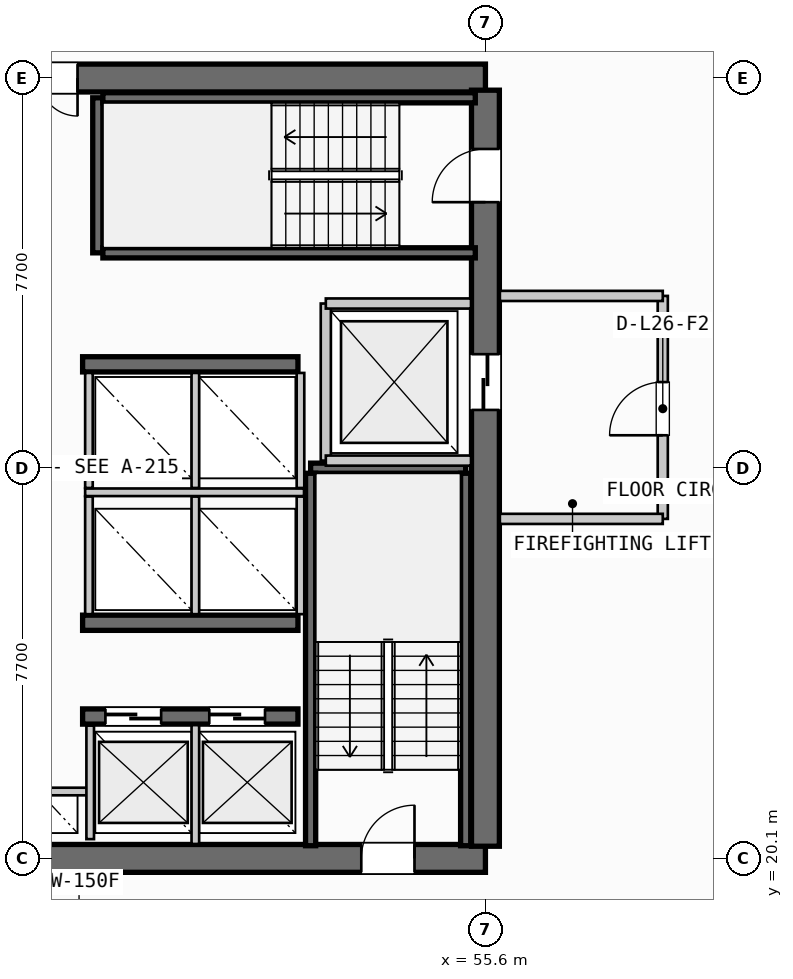
"""IFC4 building model, lengths in metres.
Left out: names, types, materials, properties, quantities, classifications, styles, units other than length and angle.
Written with IfcOpenShell. Run it as: python <this file> out.ifc"""

import sys

from ifc_helpers import new_model, si_unit, direction, frame, frame_2d, origin, place, context, subcontext, project, spatial, rectangle, extrude, source, transform, mapped, element, fill, save


model = new_model("IFC4")
c1 = context("Model", 3, precision=1e-05, world=origin(), true_north=direction((0.0, 1.0)))
c2 = subcontext(c1, "Body", "Model", "MODEL_VIEW")
j1 = project(units=[si_unit("LENGTHUNIT", "METRE"), si_unit("PLANEANGLEUNIT", "RADIAN")], contexts=[c1])
p1 = place(None, origin())
s1 = spatial("IfcSite", under=j1, at=p1, CompositionType="ELEMENT")
p2 = place(p1, origin())
s2 = spatial("IfcBuilding", under=s1, at=p2, CompositionType="ELEMENT")
p3 = place(p2, frame((0.0, 0.0, 107.2)))
s3 = spatial("IfcBuildingStorey", under=s2, at=p3, CompositionType="ELEMENT", Elevation=107.2)
p4 = place(p3, frame((38.0, 20.1, 0.0), z_axis=(0.0, 0.0, 1.0), x_axis=(1.0, 0.0, 0.0)))
e1 = element("IfcWall", 1, at=p4, inside=s3, PredefinedType="SHEAR", context=c2, shape_type="SweptSolid", body=[
    extrude(rectangle(XDim=17.6, YDim=0.55, at=frame_2d((8.8, 0.0))), origin(), (0.0, 0.0, 1.0), 3.35),
])
p5 = place(p4, frame((1.4, 0.0, 0.0)))
e2 = element("IfcOpeningElement", 2, at=p5, cuts=e1, PredefinedType="OPENING", context=c2, shape_type="SweptSolid", body=[
    extrude(rectangle(XDim=1.05, YDim=2.15, at=frame_2d((0.525, 1.075))), frame((0.0, 0.285, 0.0), z_axis=(0.0, -1.0, 0.0), x_axis=(1.0, 0.0, 0.0)), (0.0, 0.0, 1.0), 0.57),
])
p6 = place(p4, frame((15.15, 0.0, 0.0)))
e3 = element("IfcOpeningElement", 3, at=p6, cuts=e1, PredefinedType="OPENING", context=c2, shape_type="SweptSolid", body=[
    extrude(rectangle(XDim=1.05, YDim=2.15, at=frame_2d((0.525, 1.075))), frame((0.0, 0.285, 0.0), z_axis=(0.0, -1.0, 0.0), x_axis=(1.0, 0.0, 0.0)), (0.0, 0.0, 1.0), 0.57),
])
p7 = place(p3, frame((55.6, 35.5, 0.0), z_axis=(0.0, 0.0, 1.0), x_axis=(-1.0, 0.0, 0.0)))
e4 = element("IfcWall", 4, at=p7, inside=s3, PredefinedType="SHEAR", context=c2, shape_type="SweptSolid", body=[
    extrude(rectangle(XDim=17.6, YDim=0.55, at=frame_2d((8.8, 0.0))), origin(), (0.0, 0.0, 1.0), 3.35),
])
p8 = place(p7, frame((8.05, 0.0, 0.0)))
e5 = element("IfcOpeningElement", 5, at=p8, cuts=e4, PredefinedType="OPENING", context=c2, shape_type="SweptSolid", body=[
    extrude(rectangle(XDim=1.5, YDim=2.2, at=frame_2d((0.75, 1.1))), frame((0.0, 0.285, 0.0), z_axis=(0.0, -1.0, 0.0), x_axis=(1.0, 0.0, 0.0)), (0.0, 0.0, 1.0), 0.57),
])
p9 = place(p7, frame((14.95, 0.0, 0.0)))
e6 = element("IfcOpeningElement", 6, at=p9, cuts=e4, PredefinedType="OPENING", context=c2, shape_type="SweptSolid", body=[
    extrude(rectangle(XDim=1.4, YDim=2.3, at=frame_2d((0.7, 1.15))), frame((0.0, 0.285, 0.0), z_axis=(0.0, -1.0, 0.0), x_axis=(1.0, 0.0, 0.0)), (0.0, 0.0, 1.0), 0.57),
])
p10 = place(p7, frame((12.9, 0.0, 0.0)))
e7 = element("IfcOpeningElement", 7, at=p10, cuts=e4, PredefinedType="OPENING", context=c2, shape_type="SweptSolid", body=[
    extrude(rectangle(XDim=0.9, YDim=2.15, at=frame_2d((0.45, 1.075))), frame((0.0, 0.285, 0.0), z_axis=(0.0, -1.0, 0.0), x_axis=(1.0, 0.0, 0.0)), (0.0, 0.0, 1.0), 0.57),
])
p11 = place(p7, frame((10.6, 0.0, 0.0)))
e8 = element("IfcOpeningElement", 8, at=p11, cuts=e4, PredefinedType="OPENING", context=c2, shape_type="SweptSolid", body=[
    extrude(rectangle(XDim=0.95, YDim=2.15, at=frame_2d((0.475, 1.075))), frame((0.0, 0.285, 0.0), z_axis=(0.0, -1.0, 0.0), x_axis=(1.0, 0.0, 0.0)), (0.0, 0.0, 1.0), 0.57),
])
p12 = place(p3, frame((55.6, 20.34, 0.0), z_axis=(0.0, 0.0, 1.0), x_axis=(0.0, 1.0, 0.0)))
e9 = element("IfcWall", 9, at=p12, inside=s3, PredefinedType="SHEAR", context=c2, shape_type="SweptSolid", body=[
    extrude(rectangle(XDim=14.92, YDim=0.55, at=frame_2d((7.46, 0.0))), origin(), (0.0, 0.0, 1.0), 3.35),
])
p13 = place(p12, frame((12.71, 0.0, 0.0)))
e10 = element("IfcOpeningElement", 10, at=p13, cuts=e9, PredefinedType="OPENING", context=c2, shape_type="SweptSolid", body=[
    extrude(rectangle(XDim=1.05, YDim=2.15, at=frame_2d((0.525, 1.075))), frame((0.0, 0.285, 0.0), z_axis=(0.0, -1.0, 0.0), x_axis=(1.0, 0.0, 0.0)), (0.0, 0.0, 1.0), 0.57),
])
p14 = place(p12, frame((8.61, 0.0, 0.0)))
e11 = element("IfcOpeningElement", 11, at=p14, cuts=e9, PredefinedType="OPENING", context=c2, shape_type="SweptSolid", body=[
    extrude(rectangle(XDim=1.1, YDim=2.2, at=frame_2d((0.55, 1.1))), frame((0.0, 0.285, 0.0), z_axis=(0.0, -1.0, 0.0), x_axis=(1.0, 0.0, 0.0)), (0.0, 0.0, 1.0), 0.57),
])
p15 = place(p3, frame((47.65, 22.9, 0.0), z_axis=(0.0, 0.0, 1.0), x_axis=(1.0, 0.0, 0.0)))
e12 = element("IfcWall", 12, at=p15, inside=s3, PredefinedType="SHEAR", context=c2, shape_type="SweptSolid", body=[
    extrude(rectangle(XDim=4.25, YDim=0.3, at=frame_2d((2.125, 0.0))), origin(), (0.0, 0.0, 1.0), 3.35),
])
p16 = place(p15, frame((0.45, 0.0, 0.0)))
e13 = element("IfcOpeningElement", 13, at=p16, cuts=e12, PredefinedType="OPENING", context=c2, shape_type="SweptSolid", body=[
    extrude(rectangle(XDim=1.1, YDim=2.2, at=frame_2d((0.55, 1.1))), frame((0.0, 0.16, 0.0), z_axis=(0.0, -1.0, 0.0), x_axis=(1.0, 0.0, 0.0)), (0.0, 0.0, 1.0), 0.32),
])
p17 = place(p15, frame((2.5, 0.0, 0.0)))
e14 = element("IfcOpeningElement", 14, at=p17, cuts=e12, PredefinedType="OPENING", context=c2, shape_type="SweptSolid", body=[
    extrude(rectangle(XDim=1.1, YDim=2.2, at=frame_2d((0.55, 1.1))), frame((0.0, 0.16, 0.0), z_axis=(0.0, -1.0, 0.0), x_axis=(1.0, 0.0, 0.0)), (0.0, 0.0, 1.0), 0.32),
])
for number, where, z_axis, x_axis in (
    (15, (47.65, 24.75, 0.0), (0.0, 0.0, 1.0), (1.0, 0.0, 0.0)),
    (16, (47.65, 29.85, 0.0), (0.0, 0.0, 1.0), (1.0, 0.0, 0.0)),
):
    element("IfcWall", number, at=place(p3, frame(where, z_axis=z_axis, x_axis=x_axis)), inside=s3, PredefinedType="SHEAR", context=c2, shape_type="SweptSolid", body=[
        extrude(rectangle(XDim=4.25, YDim=0.3, at=frame_2d((2.125, 0.0))), origin(), (0.0, 0.0, 1.0), 3.35),
    ])
p18 = place(p3, frame((52.15, 27.8, 0.0), z_axis=(0.0, 0.0, 1.0), x_axis=(1.0, 0.0, 0.0)))
e17 = element("IfcWall", 17, at=p18, inside=s3, PredefinedType="SHEAR", context=c2, shape_type="SweptSolid", body=[
    extrude(rectangle(XDim=3.06, YDim=0.2, at=frame_2d((1.53, 0.0))), origin(), (0.0, 0.0, 1.0), 3.35),
])
for number, where, z_axis, x_axis in (
    (18, (55.21, 27.7, 0.0), (0.0, 0.0, 1.0), (0.0, -1.0, 0.0)),
    (19, (52.15, 20.35, 0.0), (0.0, 0.0, 1.0), (0.0, 1.0, 0.0)),
):
    element("IfcWall", number, at=place(p3, frame(where, z_axis=z_axis, x_axis=x_axis)), inside=s3, PredefinedType="SHEAR", context=c2, shape_type="SweptSolid", body=[
        extrude(rectangle(XDim=7.35, YDim=0.2, at=frame_2d((3.675, 0.0))), origin(), (0.0, 0.0, 1.0), 3.35),
    ])
p19 = place(p3, frame((47.95, 32.05, 0.0), z_axis=(0.0, 0.0, 1.0), x_axis=(0.0, 1.0, 0.0)))
e20 = element("IfcWall", 20, at=p19, inside=s3, PredefinedType="SHEAR", context=c2, shape_type="SweptSolid", body=[
    extrude(rectangle(XDim=3.06, YDim=0.2, at=frame_2d((1.53, 0.0))), origin(), (0.0, 0.0, 1.0), 3.35),
])
for number, where, z_axis, x_axis in (
    (21, (48.05, 35.11, 0.0), (0.0, 0.0, 1.0), (1.0, 0.0, 0.0)),
    (22, (55.4, 32.05, 0.0), (0.0, 0.0, 1.0), (-1.0, 0.0, 0.0)),
):
    element("IfcWall", number, at=place(p3, frame(where, z_axis=z_axis, x_axis=x_axis)), inside=s3, PredefinedType="SHEAR", context=c2, shape_type="SweptSolid", body=[
        extrude(rectangle(XDim=7.35, YDim=0.2, at=frame_2d((3.675, 0.0))), origin(), (0.0, 0.0, 1.0), 3.35),
    ])
p20 = place(p3, frame((45.8, 21.42, 0.0), z_axis=(0.0, 0.0, 1.0), x_axis=(1.0, 0.0, 0.0)))
e23 = element("IfcWall", 23, at=p20, inside=s3, PredefinedType="PARTITIONING", context=c2, shape_type="SweptSolid", body=[
    extrude(rectangle(XDim=2.0, YDim=0.15, at=frame_2d((1.0, 0.0))), origin(), (0.0, 0.0, 1.0), 2.28),
])
p21 = place(p3, frame((47.8, 20.48, 0.0), z_axis=(0.0, 0.0, 1.0), x_axis=(0.0, 1.0, 0.0)))
e24 = element("IfcWall", 24, at=p21, inside=s3, PredefinedType="PARTITIONING", context=c2, shape_type="SweptSolid", body=[
    extrude(rectangle(XDim=2.24, YDim=0.15, at=frame_2d((1.12, 0.0))), origin(), (0.0, 0.0, 1.0), 2.28),
])
p22 = place(p3, frame((52.45, 27.95, 0.0), z_axis=(0.0, 0.0, 1.0), x_axis=(0.0, 1.0, 0.0)))
e25 = element("IfcWall", 25, at=p22, inside=s3, PredefinedType="PARTITIONING", context=c2, shape_type="SweptSolid", body=[
    extrude(rectangle(XDim=3.1, YDim=0.2, at=frame_2d((1.55, 0.0))), origin(), (0.0, 0.0, 1.0), 2.28),
])
for number, where, z_axis, x_axis in (
    (26, (52.45, 27.95, 0.0), (0.0, 0.0, 1.0), (1.0, 0.0, 0.0)),
    (27, (52.45, 31.05, 0.0), (0.0, 0.0, 1.0), (1.0, 0.0, 0.0)),
):
    element("IfcWall", number, at=place(p3, frame(where, z_axis=z_axis, x_axis=x_axis)), inside=s3, PredefinedType="PARTITIONING", context=c2, shape_type="SweptSolid", body=[
        extrude(rectangle(XDim=2.865, YDim=0.2, at=frame_2d((1.433, 0.0))), origin(), (0.0, 0.0, 1.0), 2.28),
    ])
p23 = place(p3, frame((59.1, 26.8, 0.0), z_axis=(0.0, 0.0, 1.0), x_axis=(0.0, 1.0, 0.0)))
e28 = element("IfcWall", 28, at=p23, inside=s3, PredefinedType="PARTITIONING", context=c2, shape_type="SweptSolid", body=[
    extrude(rectangle(XDim=4.4, YDim=0.2, at=frame_2d((2.2, 0.0))), origin(), (0.0, 0.0, 1.0), 2.28),
])
p24 = place(p23, frame((1.65, 0.0, 0.0)))
e29 = element("IfcOpeningElement", 29, at=p24, cuts=e28, PredefinedType="OPENING", context=c2, shape_type="SweptSolid", body=[
    extrude(rectangle(XDim=1.05, YDim=2.15, at=frame_2d((0.525, 1.075))), frame((0.0, 0.11, 0.0), z_axis=(0.0, -1.0, 0.0), x_axis=(1.0, 0.0, 0.0)), (0.0, 0.0, 1.0), 0.22),
])
for number, where, z_axis, x_axis in (
    (30, (55.885, 26.8, 0.0), (0.0, 0.0, 1.0), (1.0, 0.0, 0.0)),
    (31, (55.885, 31.2, 0.0), (0.0, 0.0, 1.0), (1.0, 0.0, 0.0)),
):
    element("IfcWall", number, at=place(p3, frame(where, z_axis=z_axis, x_axis=x_axis)), inside=s3, PredefinedType="PARTITIONING", context=c2, shape_type="SweptSolid", body=[
        extrude(rectangle(XDim=3.215, YDim=0.2, at=frame_2d((1.607, 0.0))), origin(), (0.0, 0.0, 1.0), 2.28),
    ])
p25 = place(p3, frame((49.875, 20.385, 0.0), z_axis=(0.0, 0.0, 1.0), x_axis=(0.0, 1.0, 0.0)))
e32 = element("IfcWall", 32, at=p25, inside=s3, PredefinedType="PARTITIONING", context=c2, shape_type="SweptSolid", body=[
    extrude(rectangle(XDim=2.345, YDim=0.15, at=frame_2d((1.172, 0.0))), origin(), (0.0, 0.0, 1.0), 2.28),
])
p26 = place(p3, frame((47.7, 27.325, 0.0), z_axis=(0.0, 0.0, 1.0), x_axis=(1.0, 0.0, 0.0)))
e33 = element("IfcWall", 33, at=p26, inside=s3, PredefinedType="PARTITIONING", context=c2, shape_type="SweptSolid", body=[
    extrude(rectangle(XDim=4.32, YDim=0.15, at=frame_2d((2.16, 0.0))), origin(), (0.0, 0.0, 1.0), 2.28),
])
for number, where, z_axis, x_axis in (
    (34, (47.775, 24.92, 0.0), (0.0, 0.0, 1.0), (0.0, 1.0, 0.0)),
    (35, (49.875, 24.92, 0.0), (0.0, 0.0, 1.0), (0.0, 1.0, 0.0)),
    (36, (51.95, 24.92, 0.0), (0.0, 0.0, 1.0), (0.0, 1.0, 0.0)),
):
    element("IfcWall", number, at=place(p3, frame(where, z_axis=z_axis, x_axis=x_axis)), inside=s3, PredefinedType="PARTITIONING", context=c2, shape_type="SweptSolid", body=[
        extrude(rectangle(XDim=2.32, YDim=0.15, at=frame_2d((1.16, 0.0))), origin(), (0.0, 0.0, 1.0), 2.28),
    ])
for number, where, z_axis, x_axis in (
    (37, (47.775, 27.41, 0.0), (0.0, 0.0, 1.0), (0.0, 1.0, 0.0)),
    (38, (49.875, 27.41, 0.0), (0.0, 0.0, 1.0), (0.0, 1.0, 0.0)),
    (39, (51.95, 27.41, 0.0), (0.0, 0.0, 1.0), (0.0, 1.0, 0.0)),
):
    element("IfcWall", number, at=place(p3, frame(where, z_axis=z_axis, x_axis=x_axis)), inside=s3, PredefinedType="PARTITIONING", context=c2, shape_type="SweptSolid", body=[
        extrude(rectangle(XDim=2.27, YDim=0.15, at=frame_2d((1.135, 0.0))), origin(), (0.0, 0.0, 1.0), 2.28),
    ])
m1 = source(origin(), c2, "Body", "SweptSolid", [
    extrude(rectangle(XDim=1.05, YDim=2.15, at=frame_2d((0.525, 1.075))), frame((0.0, 0.025, 0.0), z_axis=(0.0, -1.0, 0.0), x_axis=(1.0, 0.0, 0.0)), (0.0, 0.0, 1.0), 0.05),
])
p27 = place(p6, origin())
e40 = element("IfcDoor", 40, at=p27, inside=s3, OperationType="SINGLE_SWING_RIGHT", PredefinedType="DOOR", context=c2, shape_type="MappedRepresentation", body=[
    mapped(m1, transform((0.0, 0.0, 0.0), scale=1.0)),
])
fill(e3, e40)
p28 = place(p13, origin())
e41 = element("IfcDoor", 41, at=p28, inside=s3, OperationType="SINGLE_SWING_LEFT", PredefinedType="DOOR", context=c2, shape_type="MappedRepresentation", body=[
    mapped(m1, transform((0.0, 0.0, 0.0), scale=1.0)),
])
fill(e10, e41)
m2 = source(origin(), c2, "Body", "SweptSolid", [
    extrude(rectangle(XDim=1.5, YDim=2.2, at=frame_2d((0.75, 1.1))), frame((0.0, 0.025, 0.0), z_axis=(0.0, -1.0, 0.0), x_axis=(1.0, 0.0, 0.0)), (0.0, 0.0, 1.0), 0.05),
])
p29 = place(p8, origin())
e42 = element("IfcDoor", 42, at=p29, inside=s3, OperationType="DOUBLE_DOOR_SINGLE_SWING", PredefinedType="DOOR", context=c2, shape_type="MappedRepresentation", body=[
    mapped(m2, transform((0.0, 0.0, 0.0), scale=1.0)),
])
fill(e5, e42)
m3 = source(origin(), c2, "Body", "SweptSolid", [
    extrude(rectangle(XDim=1.1, YDim=2.2, at=frame_2d((0.55, 1.1))), frame((0.0, 0.025, 0.0), z_axis=(0.0, -1.0, 0.0), x_axis=(1.0, 0.0, 0.0)), (0.0, 0.0, 1.0), 0.05),
])
p30 = place(p14, origin())
e43 = element("IfcDoor", 43, at=p30, inside=s3, OperationType="SLIDING_TO_RIGHT", PredefinedType="DOOR", context=c2, shape_type="MappedRepresentation", body=[
    mapped(m3, transform((0.0, 0.0, 0.0), scale=1.0)),
])
fill(e11, e43)
p31 = place(p16, origin())
e44 = element("IfcDoor", 44, at=p31, inside=s3, OperationType="SLIDING_TO_LEFT", PredefinedType="DOOR", context=c2, shape_type="MappedRepresentation", body=[
    mapped(m3, transform((0.0, 0.0, 0.0), scale=1.0)),
])
fill(e13, e44)
p32 = place(p17, origin())
e45 = element("IfcDoor", 45, at=p32, inside=s3, OperationType="SLIDING_TO_LEFT", PredefinedType="DOOR", context=c2, shape_type="MappedRepresentation", body=[
    mapped(m3, transform((0.0, 0.0, 0.0), scale=1.0)),
])
fill(e14, e45)
p33 = place(p24, origin())
e46 = element("IfcDoor", 46, at=p33, inside=s3, OperationType="SINGLE_SWING_LEFT", PredefinedType="DOOR", context=c2, shape_type="MappedRepresentation", body=[
    mapped(m1, transform((0.0, 0.0, 0.0), scale=1.0)),
])
fill(e29, e46)
save(model, sys.argv[1])
